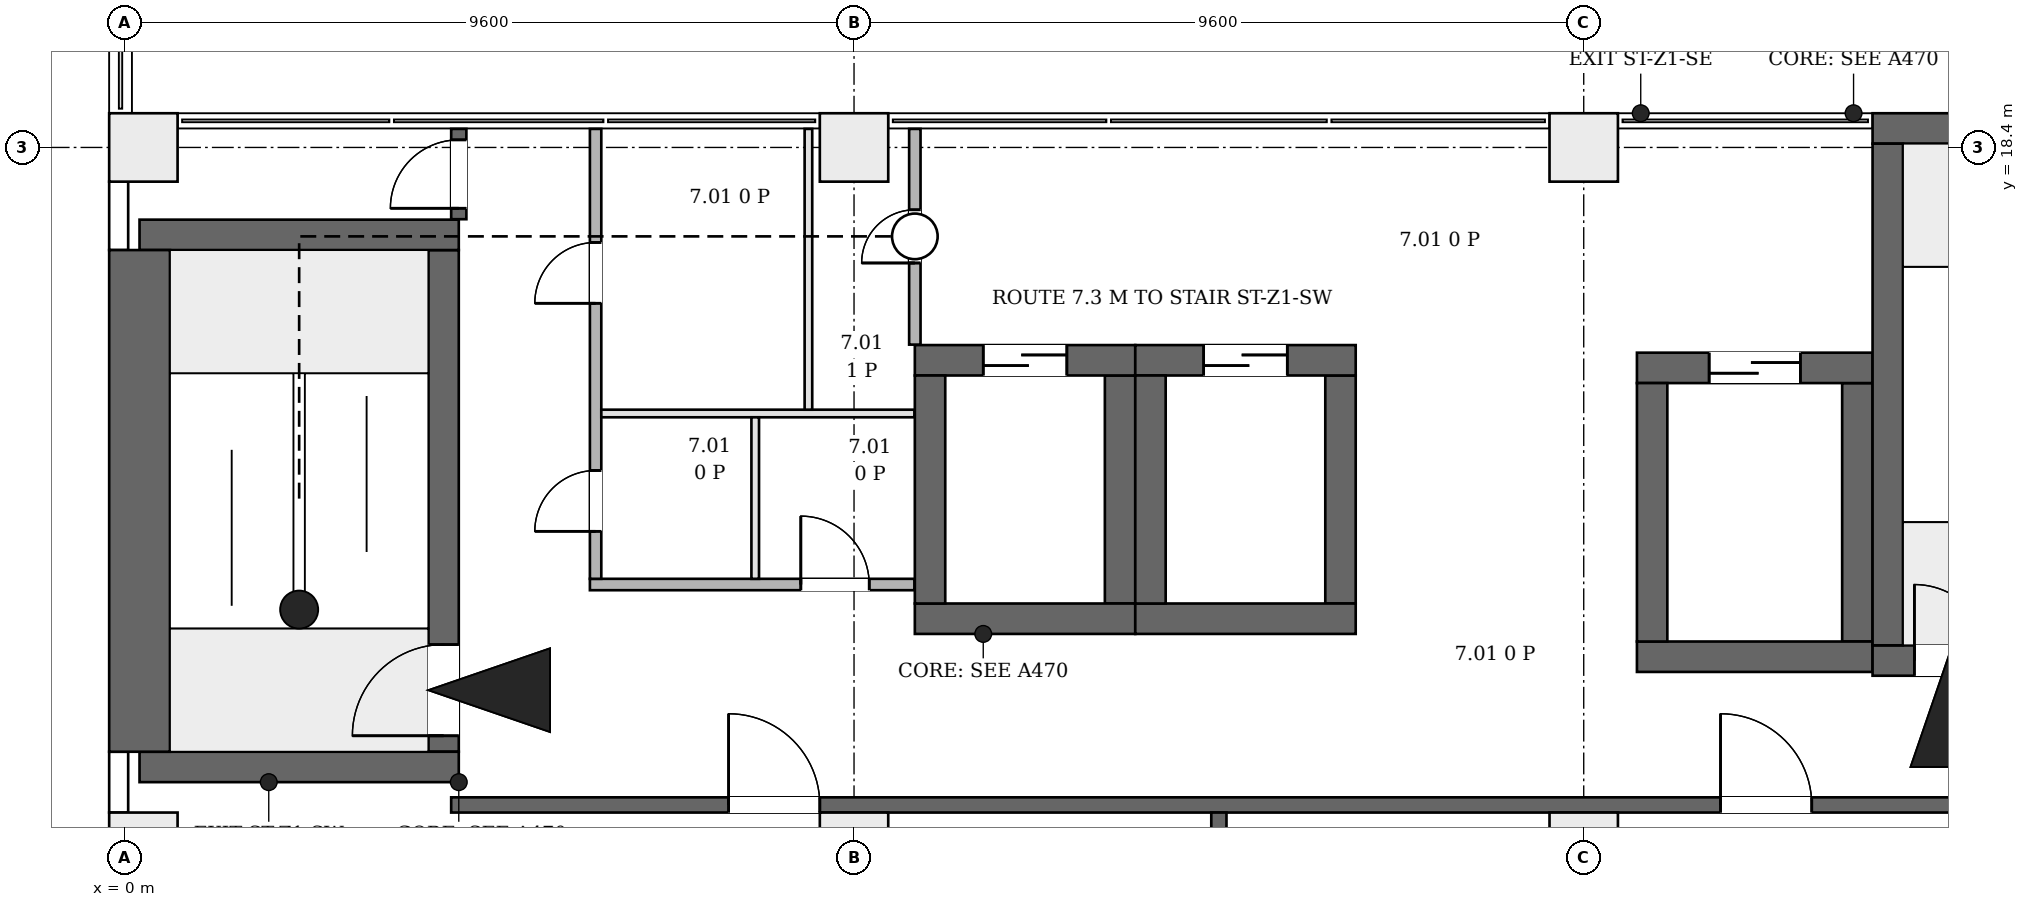
"""IFC4 building model, lengths in metres.
Left out: names, types, materials, properties, quantities, classifications, styles, units other than length and angle.
Written with IfcOpenShell. Run it as: python <this file> out.ifc"""

import sys

from ifc_helpers import new_model, si_unit, direction, frame, frame_2d, origin, origin_2d, place, context, subcontext, project, spatial, rectangle, extrude, element, fill, save


model = new_model("IFC4")
c1 = context("Model", 3, precision=1e-05, world=origin(), true_north=direction((0.0, 1.0)))
c2 = subcontext(c1, "Body", "Model", "MODEL_VIEW")
j1 = project(units=[si_unit("LENGTHUNIT", "METRE"), si_unit("PLANEANGLEUNIT", "RADIAN")], contexts=[c1])
p1 = place(None, origin())
s1 = spatial("IfcSite", under=j1, at=p1, CompositionType="ELEMENT")
p2 = place(p1, origin())
s2 = spatial("IfcBuilding", under=s1, at=p2, CompositionType="ELEMENT")
p3 = place(p2, frame((0.0, 0.0, 40.3)))
s3 = spatial("IfcBuildingStorey", under=s2, at=p3, CompositionType="ELEMENT", Elevation=40.3)
for number, where, z_axis, x_axis in (
    (1, (0.2, 10.25, 0.0), (0.0, 0.0, 1.0), (1.0, 0.0, 0.0)),
    (2, (0.2, 17.25, 0.0), (0.0, 0.0, 1.0), (1.0, 0.0, 0.0)),
):
    element("IfcWall", number, at=place(p3, frame(where, z_axis=z_axis, x_axis=x_axis)), inside=s3, PredefinedType="SHEAR", context=c2, shape_type="SweptSolid", body=[
        extrude(rectangle(XDim=4.2, YDim=0.4, at=frame_2d((2.1, 0.0))), origin(), (0.0, 0.0, 1.0), 4.2),
    ])
p4 = place(p3, frame((0.2, 10.45, 0.0), z_axis=(0.0, 0.0, 1.0), x_axis=(0.0, 1.0, 0.0)))
e3 = element("IfcWall", 3, at=p4, inside=s3, PredefinedType="SHEAR", context=c2, shape_type="SweptSolid", body=[
    extrude(rectangle(XDim=6.6, YDim=0.8, at=frame_2d((3.3, 0.0))), origin(), (0.0, 0.0, 1.0), 4.2),
])
p5 = place(p3, frame((4.2, 10.45, 0.0), z_axis=(0.0, 0.0, 1.0), x_axis=(0.0, 1.0, 0.0)))
e4 = element("IfcWall", 4, at=p5, inside=s3, PredefinedType="SHEAR", context=c2, shape_type="SweptSolid", body=[
    extrude(rectangle(XDim=6.6, YDim=0.4, at=frame_2d((3.3, 0.0))), origin(), (0.0, 0.0, 1.0), 4.2),
])
p6 = place(p5, frame((0.21, 0.0, 0.0)))
e5 = element("IfcOpeningElement", 5, at=p6, cuts=e4, PredefinedType="OPENING", context=c2, shape_type="SweptSolid", body=[
    extrude(rectangle(XDim=1.2, YDim=2.1, at=frame_2d((0.6, 1.05))), frame((0.0, 0.21, 0.0), z_axis=(0.0, -1.0, 0.0), x_axis=(1.0, 0.0, 0.0)), (0.0, 0.0, 1.0), 0.42),
])
p7 = place(p3, frame((23.0, 11.65, 0.0), z_axis=(0.0, 0.0, 1.0), x_axis=(1.0, 0.0, 0.0)))
e6 = element("IfcWall", 6, at=p7, inside=s3, PredefinedType="SHEAR", context=c2, shape_type="SweptSolid", body=[
    extrude(rectangle(XDim=4.2, YDim=0.4, at=frame_2d((2.1, 0.0))), origin(), (0.0, 0.0, 1.0), 4.2),
])
p8 = place(p7, frame((0.55, 0.0, 0.0)))
e7 = element("IfcOpeningElement", 7, at=p8, cuts=e6, PredefinedType="OPENING", context=c2, shape_type="SweptSolid", body=[
    extrude(rectangle(XDim=1.0, YDim=2.1, at=frame_2d((0.5, 1.05))), frame((0.0, 0.21, 0.0), z_axis=(0.0, -1.0, 0.0), x_axis=(1.0, 0.0, 0.0)), (0.0, 0.0, 1.0), 0.42),
])
p9 = place(p7, frame((2.65, 0.0, 0.0)))
e8 = element("IfcOpeningElement", 8, at=p9, cuts=e6, PredefinedType="OPENING", context=c2, shape_type="SweptSolid", body=[
    extrude(rectangle(XDim=1.0, YDim=2.1, at=frame_2d((0.5, 1.05))), frame((0.0, 0.21, 0.0), z_axis=(0.0, -1.0, 0.0), x_axis=(1.0, 0.0, 0.0)), (0.0, 0.0, 1.0), 0.42),
])
p10 = place(p3, frame((23.0, 18.65, 0.0), z_axis=(0.0, 0.0, 1.0), x_axis=(1.0, 0.0, 0.0)))
e9 = element("IfcWall", 9, at=p10, inside=s3, PredefinedType="SHEAR", context=c2, shape_type="SweptSolid", body=[
    extrude(rectangle(XDim=4.2, YDim=0.4, at=frame_2d((2.1, 0.0))), origin(), (0.0, 0.0, 1.0), 4.2),
])
p11 = place(p3, frame((23.2, 11.85, 0.0), z_axis=(0.0, 0.0, 1.0), x_axis=(0.0, 1.0, 0.0)))
e10 = element("IfcWall", 10, at=p11, inside=s3, PredefinedType="SHEAR", context=c2, shape_type="SweptSolid", body=[
    extrude(rectangle(XDim=6.6, YDim=0.4, at=frame_2d((3.3, 0.0))), origin(), (0.0, 0.0, 1.0), 4.2),
])
p12 = place(p3, frame((10.4, 12.2, 0.0), z_axis=(0.0, 0.0, 1.0), x_axis=(1.0, 0.0, 0.0)))
e11 = element("IfcWall", 11, at=p12, inside=s3, PredefinedType="SHEAR", context=c2, shape_type="SweptSolid", body=[
    extrude(rectangle(XDim=2.9, YDim=0.4, at=frame_2d((1.45, 0.0))), origin(), (0.0, 0.0, 1.0), 4.2),
])
p13 = place(p3, frame((10.4, 15.6, 0.0), z_axis=(0.0, 0.0, 1.0), x_axis=(1.0, 0.0, 0.0)))
e12 = element("IfcWall", 12, at=p13, inside=s3, PredefinedType="SHEAR", context=c2, shape_type="SweptSolid", body=[
    extrude(rectangle(XDim=2.9, YDim=0.4, at=frame_2d((1.45, 0.0))), origin(), (0.0, 0.0, 1.0), 4.2),
])
p14 = place(p13, frame((0.9, 0.0, 0.0)))
e13 = element("IfcOpeningElement", 13, at=p14, cuts=e12, PredefinedType="OPENING", context=c2, shape_type="SweptSolid", body=[
    extrude(rectangle(XDim=1.1, YDim=2.1, at=frame_2d((0.55, 1.05))), frame((0.0, 0.21, 0.0), z_axis=(0.0, -1.0, 0.0), x_axis=(1.0, 0.0, 0.0)), (0.0, 0.0, 1.0), 0.42),
])
for number, where, z_axis, x_axis in (
    (14, (10.6, 12.4, 0.0), (0.0, 0.0, 1.0), (0.0, 1.0, 0.0)),
    (15, (13.1, 12.4, 0.0), (0.0, 0.0, 1.0), (0.0, 1.0, 0.0)),
):
    element("IfcWall", number, at=place(p3, frame(where, z_axis=z_axis, x_axis=x_axis)), inside=s3, PredefinedType="SHEAR", context=c2, shape_type="SweptSolid", body=[
        extrude(rectangle(XDim=3.0, YDim=0.4, at=frame_2d((1.5, 0.0))), origin(), (0.0, 0.0, 1.0), 4.2),
    ])
p15 = place(p3, frame((13.3, 12.2, 0.0), z_axis=(0.0, 0.0, 1.0), x_axis=(1.0, 0.0, 0.0)))
e16 = element("IfcWall", 16, at=p15, inside=s3, PredefinedType="SHEAR", context=c2, shape_type="SweptSolid", body=[
    extrude(rectangle(XDim=2.9, YDim=0.4, at=frame_2d((1.45, 0.0))), origin(), (0.0, 0.0, 1.0), 4.2),
])
p16 = place(p3, frame((13.3, 15.6, 0.0), z_axis=(0.0, 0.0, 1.0), x_axis=(1.0, 0.0, 0.0)))
e17 = element("IfcWall", 17, at=p16, inside=s3, PredefinedType="SHEAR", context=c2, shape_type="SweptSolid", body=[
    extrude(rectangle(XDim=2.9, YDim=0.4, at=frame_2d((1.45, 0.0))), origin(), (0.0, 0.0, 1.0), 4.2),
])
p17 = place(p16, frame((0.9, 0.0, 0.0)))
e18 = element("IfcOpeningElement", 18, at=p17, cuts=e17, PredefinedType="OPENING", context=c2, shape_type="SweptSolid", body=[
    extrude(rectangle(XDim=1.1, YDim=2.1, at=frame_2d((0.55, 1.05))), frame((0.0, 0.21, 0.0), z_axis=(0.0, -1.0, 0.0), x_axis=(1.0, 0.0, 0.0)), (0.0, 0.0, 1.0), 0.42),
])
for number, where, z_axis, x_axis in (
    (19, (13.5, 12.4, 0.0), (0.0, 0.0, 1.0), (0.0, 1.0, 0.0)),
    (20, (16.0, 12.4, 0.0), (0.0, 0.0, 1.0), (0.0, 1.0, 0.0)),
):
    element("IfcWall", number, at=place(p3, frame(where, z_axis=z_axis, x_axis=x_axis)), inside=s3, PredefinedType="SHEAR", context=c2, shape_type="SweptSolid", body=[
        extrude(rectangle(XDim=3.0, YDim=0.4, at=frame_2d((1.5, 0.0))), origin(), (0.0, 0.0, 1.0), 4.2),
    ])
p18 = place(p3, frame((19.9, 11.7, 0.0), z_axis=(0.0, 0.0, 1.0), x_axis=(1.0, 0.0, 0.0)))
e21 = element("IfcWall", 21, at=p18, inside=s3, PredefinedType="SHEAR", context=c2, shape_type="SweptSolid", body=[
    extrude(rectangle(XDim=3.1, YDim=0.4, at=frame_2d((1.55, 0.0))), origin(), (0.0, 0.0, 1.0), 4.2),
])
p19 = place(p3, frame((19.9, 15.5, 0.0), z_axis=(0.0, 0.0, 1.0), x_axis=(1.0, 0.0, 0.0)))
e22 = element("IfcWall", 22, at=p19, inside=s3, PredefinedType="SHEAR", context=c2, shape_type="SweptSolid", body=[
    extrude(rectangle(XDim=3.1, YDim=0.4, at=frame_2d((1.55, 0.0))), origin(), (0.0, 0.0, 1.0), 4.2),
])
p20 = place(p19, frame((0.95, 0.0, 0.0)))
e23 = element("IfcOpeningElement", 23, at=p20, cuts=e22, PredefinedType="OPENING", context=c2, shape_type="SweptSolid", body=[
    extrude(rectangle(XDim=1.2, YDim=2.1, at=frame_2d((0.6, 1.05))), frame((0.0, 0.21, 0.0), z_axis=(0.0, -1.0, 0.0), x_axis=(1.0, 0.0, 0.0)), (0.0, 0.0, 1.0), 0.42),
])
for number, where, z_axis, x_axis in (
    (24, (20.1, 11.9, 0.0), (0.0, 0.0, 1.0), (0.0, 1.0, 0.0)),
    (25, (22.8, 11.9, 0.0), (0.0, 0.0, 1.0), (0.0, 1.0, 0.0)),
):
    element("IfcWall", number, at=place(p3, frame(where, z_axis=z_axis, x_axis=x_axis)), inside=s3, PredefinedType="SHEAR", context=c2, shape_type="SweptSolid", body=[
        extrude(rectangle(XDim=3.4, YDim=0.4, at=frame_2d((1.7, 0.0))), origin(), (0.0, 0.0, 1.0), 4.2),
    ])
for number, where, z_axis, x_axis in (
    (26, (0.25, 9.2, 0.0), (0.0, 0.0, 1.0), (1.0, 0.0, 0.0)),
    (27, (9.6, 9.2, 0.0), (0.0, 0.0, 1.0), (1.0, 0.0, 0.0)),
    (28, (19.2, 9.2, 0.0), (0.0, 0.0, 1.0), (1.0, 0.0, 0.0)),
    (29, (0.25, 18.4, 0.0), (0.0, 0.0, 1.0), (1.0, 0.0, 0.0)),
    (30, (9.6, 18.4, 0.0), (0.0, 0.0, 1.0), (1.0, 0.0, 0.0)),
    (31, (19.2, 18.4, 0.0), (0.0, 0.0, 1.0), (1.0, 0.0, 0.0)),
):
    element("IfcColumn", number, at=place(p3, frame(where, z_axis=z_axis, x_axis=x_axis)), inside=s3, PredefinedType="COLUMN", context=c2, shape_type="SweptSolid", body=[
        extrude(rectangle(XDim=0.9, YDim=0.9, at=origin_2d()), origin(), (0.0, 0.0, 1.0), 4.2),
    ])
p21 = place(p3, frame((-0.074, 10.45, 0.0), z_axis=(0.0, 0.0, 1.0), x_axis=(0.0, -1.0, 0.0)))
e32 = element("IfcWall", 32, at=p21, inside=s3, PredefinedType="ELEMENTEDWALL", context=c2, shape_type="SweptSolid", body=[
    extrude(rectangle(XDim=0.8, YDim=0.25, at=frame_2d((0.4, 0.0))), origin(), (0.0, 0.0, 1.0), 3.9),
])
p22 = place(p3, frame((-0.074, 17.95, 0.0), z_axis=(0.0, 0.0, 1.0), x_axis=(0.0, -1.0, 0.0)))
e33 = element("IfcWall", 33, at=p22, inside=s3, PredefinedType="ELEMENTEDWALL", context=c2, shape_type="SweptSolid", body=[
    extrude(rectangle(XDim=0.9, YDim=0.25, at=frame_2d((0.45, 0.0))), origin(), (0.0, 0.0, 1.0), 3.9),
])
p23 = place(p3, frame((4.3, 9.75, 0.0), z_axis=(0.0, 0.0, 1.0), x_axis=(1.0, 0.0, 0.0)))
e34 = element("IfcWall", 34, at=p23, inside=s3, PredefinedType="PARTITIONING", context=c2, shape_type="SweptSolid", body=[
    extrude(rectangle(XDim=43.894, YDim=0.2, at=frame_2d((21.947, 0.0))), origin(), (0.0, 0.0, 1.0), 3.9),
])
p24 = place(p23, frame((3.65, 0.0, 0.0)))
e35 = element("IfcOpeningElement", 35, at=p24, cuts=e34, PredefinedType="OPENING", context=c2, shape_type="SweptSolid", body=[
    extrude(rectangle(XDim=1.2, YDim=2.1, at=frame_2d((0.6, 1.05))), frame((0.0, 0.11, 0.0), z_axis=(0.0, -1.0, 0.0), x_axis=(1.0, 0.0, 0.0)), (0.0, 0.0, 1.0), 0.22),
])
p25 = place(p23, frame((16.7, 0.0, 0.0)))
e36 = element("IfcOpeningElement", 36, at=p25, cuts=e34, PredefinedType="OPENING", context=c2, shape_type="SweptSolid", body=[
    extrude(rectangle(XDim=1.2, YDim=2.1, at=frame_2d((0.6, 1.05))), frame((0.0, 0.11, 0.0), z_axis=(0.0, -1.0, 0.0), x_axis=(1.0, 0.0, 0.0)), (0.0, 0.0, 1.0), 0.22),
])
p26 = place(p23, frame((26.45, 0.0, 0.0)))
e37 = element("IfcOpeningElement", 37, at=p26, cuts=e34, PredefinedType="OPENING", context=c2, shape_type="SweptSolid", body=[
    extrude(rectangle(XDim=0.9, YDim=2.1, at=frame_2d((0.45, 1.05))), frame((0.0, 0.11, 0.0), z_axis=(0.0, -1.0, 0.0), x_axis=(1.0, 0.0, 0.0)), (0.0, 0.0, 1.0), 0.22),
])
p27 = place(p23, frame((36.0, 0.0, 0.0)))
e38 = element("IfcOpeningElement", 38, at=p27, cuts=e34, PredefinedType="OPENING", context=c2, shape_type="SweptSolid", body=[
    extrude(rectangle(XDim=1.2, YDim=2.1, at=frame_2d((0.6, 1.05))), frame((0.0, 0.11, 0.0), z_axis=(0.0, -1.0, 0.0), x_axis=(1.0, 0.0, 0.0)), (0.0, 0.0, 1.0), 0.22),
])
p28 = place(p3, frame((4.4, 17.456, 0.0), z_axis=(0.0, 0.0, 1.0), x_axis=(0.0, 1.0, 0.0)))
e39 = element("IfcWall", 39, at=p28, inside=s3, PredefinedType="PARTITIONING", context=c2, shape_type="SweptSolid", body=[
    extrude(rectangle(XDim=1.188, YDim=0.2, at=frame_2d((0.594, 0.0))), origin(), (0.0, 0.0, 1.0), 3.9),
])
p29 = place(p28, frame((0.144, 0.0, 0.0)))
e40 = element("IfcOpeningElement", 40, at=p29, cuts=e39, PredefinedType="OPENING", context=c2, shape_type="SweptSolid", body=[
    extrude(rectangle(XDim=0.9, YDim=2.1, at=frame_2d((0.45, 1.05))), frame((0.0, 0.11, 0.0), z_axis=(0.0, -1.0, 0.0), x_axis=(1.0, 0.0, 0.0)), (0.0, 0.0, 1.0), 0.22),
])
p30 = place(p3, frame((6.125, 12.65, 0.0), z_axis=(0.0, 0.0, 1.0), x_axis=(1.0, 0.0, 0.0)))
e41 = element("IfcWall", 41, at=p30, inside=s3, PredefinedType="PARTITIONING", context=c2, shape_type="SweptSolid", body=[
    extrude(rectangle(XDim=4.269, YDim=0.15, at=frame_2d((2.135, 0.0))), origin(), (0.0, 0.0, 1.0), 3.9),
])
p31 = place(p30, frame((2.775, 0.0, 0.0)))
e42 = element("IfcOpeningElement", 42, at=p31, cuts=e41, PredefinedType="OPENING", context=c2, shape_type="SweptSolid", body=[
    extrude(rectangle(XDim=0.9, YDim=2.1, at=frame_2d((0.45, 1.05))), frame((0.0, 0.085, 0.0), z_axis=(0.0, -1.0, 0.0), x_axis=(1.0, 0.0, 0.0)), (0.0, 0.0, 1.0), 0.17),
])
p32 = place(p3, frame((6.2, 12.725, 0.0), z_axis=(0.0, 0.0, 1.0), x_axis=(0.0, 1.0, 0.0)))
e43 = element("IfcWall", 43, at=p32, inside=s3, PredefinedType="PARTITIONING", context=c2, shape_type="SweptSolid", body=[
    extrude(rectangle(XDim=5.919, YDim=0.15, at=frame_2d((2.959, 0.0))), origin(), (0.0, 0.0, 1.0), 3.9),
])
p33 = place(p32, frame((0.625, 0.0, 0.0)))
e44 = element("IfcOpeningElement", 44, at=p33, cuts=e43, PredefinedType="OPENING", context=c2, shape_type="SweptSolid", body=[
    extrude(rectangle(XDim=0.8, YDim=2.1, at=frame_2d((0.4, 1.05))), frame((0.0, 0.085, 0.0), z_axis=(0.0, -1.0, 0.0), x_axis=(1.0, 0.0, 0.0)), (0.0, 0.0, 1.0), 0.17),
])
p34 = place(p32, frame((3.625, 0.0, 0.0)))
e45 = element("IfcOpeningElement", 45, at=p34, cuts=e43, PredefinedType="OPENING", context=c2, shape_type="SweptSolid", body=[
    extrude(rectangle(XDim=0.8, YDim=2.1, at=frame_2d((0.4, 1.05))), frame((0.0, 0.085, 0.0), z_axis=(0.0, -1.0, 0.0), x_axis=(1.0, 0.0, 0.0)), (0.0, 0.0, 1.0), 0.17),
])
p35 = place(p3, frame((6.275, 14.9, 0.0), z_axis=(0.0, 0.0, 1.0), x_axis=(1.0, 0.0, 0.0)))
e46 = element("IfcWall", 46, at=p35, inside=s3, PredefinedType="PARTITIONING", context=c2, shape_type="SweptSolid", body=[
    extrude(rectangle(XDim=4.119, YDim=0.1, at=frame_2d((2.06, 0.0))), origin(), (0.0, 0.0, 1.0), 3.9),
])
p36 = place(p3, frame((8.3, 12.725, 0.0), z_axis=(0.0, 0.0, 1.0), x_axis=(0.0, 1.0, 0.0)))
e47 = element("IfcWall", 47, at=p36, inside=s3, PredefinedType="PARTITIONING", context=c2, shape_type="SweptSolid", body=[
    extrude(rectangle(XDim=2.125, YDim=0.1, at=frame_2d((1.062, 0.0))), origin(), (0.0, 0.0, 1.0), 3.9),
])
p37 = place(p3, frame((9.0, 14.95, 0.0), z_axis=(0.0, 0.0, 1.0), x_axis=(0.0, 1.0, 0.0)))
e48 = element("IfcWall", 48, at=p37, inside=s3, PredefinedType="PARTITIONING", context=c2, shape_type="SweptSolid", body=[
    extrude(rectangle(XDim=3.694, YDim=0.1, at=frame_2d((1.847, 0.0))), origin(), (0.0, 0.0, 1.0), 3.9),
])
p38 = place(p3, frame((10.4, 15.806, 0.0), z_axis=(0.0, 0.0, 1.0), x_axis=(0.0, 1.0, 0.0)))
e49 = element("IfcWall", 49, at=p38, inside=s3, PredefinedType="PARTITIONING", context=c2, shape_type="SweptSolid", body=[
    extrude(rectangle(XDim=2.838, YDim=0.15, at=frame_2d((1.419, 0.0))), origin(), (0.0, 0.0, 1.0), 3.9),
])
p39 = place(p38, frame((1.074, 0.0, 0.0)))
e50 = element("IfcOpeningElement", 50, at=p39, cuts=e49, PredefinedType="OPENING", context=c2, shape_type="SweptSolid", body=[
    extrude(rectangle(XDim=0.7, YDim=2.1, at=frame_2d((0.35, 1.05))), frame((0.0, 0.085, 0.0), z_axis=(0.0, -1.0, 0.0), x_axis=(1.0, 0.0, 0.0)), (0.0, 0.0, 1.0), 0.17),
])
p40 = place(p3, frame((14.4, 0.006, 0.0), z_axis=(0.0, 0.0, 1.0), x_axis=(0.0, 1.0, 0.0)))
e51 = element("IfcWall", 51, at=p40, inside=s3, PredefinedType="PARTITIONING", context=c2, shape_type="SweptSolid", body=[
    extrude(rectangle(XDim=9.644, YDim=0.2, at=frame_2d((4.822, 0.0))), origin(), (0.0, 0.0, 1.0), 3.9),
])
p41 = place(p6, origin())
e52 = element("IfcDoor", 52, at=p41, inside=s3, OperationType="SINGLE_SWING_RIGHT", PredefinedType="DOOR", context=c2, shape_type="SweptSolid", body=[
    extrude(rectangle(XDim=1.2, YDim=2.1, at=frame_2d((0.6, 1.05))), frame((0.0, 0.025, 0.0), z_axis=(0.0, -1.0, 0.0), x_axis=(1.0, 0.0, 0.0)), (0.0, 0.0, 1.0), 0.05),
])
fill(e5, e52)
p42 = place(p8, origin())
e53 = element("IfcDoor", 53, at=p42, inside=s3, OperationType="SINGLE_SWING_RIGHT", PredefinedType="DOOR", context=c2, shape_type="SweptSolid", body=[
    extrude(rectangle(XDim=1.0, YDim=2.1, at=frame_2d((0.5, 1.05))), frame((0.0, 0.025, 0.0), z_axis=(0.0, -1.0, 0.0), x_axis=(1.0, 0.0, 0.0)), (0.0, 0.0, 1.0), 0.05),
])
fill(e7, e53)
p43 = place(p14, origin())
e54 = element("IfcDoor", 54, at=p43, inside=s3, OperationType="DOUBLE_DOOR_SLIDING", PredefinedType="DOOR", context=c2, shape_type="SweptSolid", body=[
    extrude(rectangle(XDim=1.1, YDim=2.1, at=frame_2d((0.55, 1.05))), frame((0.0, 0.025, 0.0), z_axis=(0.0, -1.0, 0.0), x_axis=(1.0, 0.0, 0.0)), (0.0, 0.0, 1.0), 0.05),
])
fill(e13, e54)
p44 = place(p17, origin())
e55 = element("IfcDoor", 55, at=p44, inside=s3, OperationType="DOUBLE_DOOR_SLIDING", PredefinedType="DOOR", context=c2, shape_type="SweptSolid", body=[
    extrude(rectangle(XDim=1.1, YDim=2.1, at=frame_2d((0.55, 1.05))), frame((0.0, 0.025, 0.0), z_axis=(0.0, -1.0, 0.0), x_axis=(1.0, 0.0, 0.0)), (0.0, 0.0, 1.0), 0.05),
])
fill(e18, e55)
p45 = place(p20, origin())
e56 = element("IfcDoor", 56, at=p45, inside=s3, OperationType="DOUBLE_DOOR_SLIDING", PredefinedType="DOOR", context=c2, shape_type="SweptSolid", body=[
    extrude(rectangle(XDim=1.2, YDim=2.1, at=frame_2d((0.6, 1.05))), frame((0.0, 0.025, 0.0), z_axis=(0.0, -1.0, 0.0), x_axis=(1.0, 0.0, 0.0)), (0.0, 0.0, 1.0), 0.05),
])
fill(e23, e56)
p46 = place(p29, origin())
e57 = element("IfcDoor", 57, at=p46, inside=s3, OperationType="SINGLE_SWING_LEFT", PredefinedType="DOOR", context=c2, shape_type="SweptSolid", body=[
    extrude(rectangle(XDim=0.9, YDim=2.1, at=frame_2d((0.45, 1.05))), frame((0.0, 0.025, 0.0), z_axis=(0.0, -1.0, 0.0), x_axis=(1.0, 0.0, 0.0)), (0.0, 0.0, 1.0), 0.05),
])
fill(e40, e57)
p47 = place(p33, origin())
e58 = element("IfcDoor", 58, at=p47, inside=s3, OperationType="SINGLE_SWING_LEFT", PredefinedType="DOOR", context=c2, shape_type="SweptSolid", body=[
    extrude(rectangle(XDim=0.8, YDim=2.1, at=frame_2d((0.4, 1.05))), frame((0.0, 0.025, 0.0), z_axis=(0.0, -1.0, 0.0), x_axis=(1.0, 0.0, 0.0)), (0.0, 0.0, 1.0), 0.05),
])
fill(e44, e58)
p48 = place(p31, origin())
e59 = element("IfcDoor", 59, at=p48, inside=s3, OperationType="SINGLE_SWING_RIGHT", PredefinedType="DOOR", context=c2, shape_type="SweptSolid", body=[
    extrude(rectangle(XDim=0.9, YDim=2.1, at=frame_2d((0.45, 1.05))), frame((0.0, 0.025, 0.0), z_axis=(0.0, -1.0, 0.0), x_axis=(1.0, 0.0, 0.0)), (0.0, 0.0, 1.0), 0.05),
])
fill(e42, e59)
p49 = place(p34, origin())
e60 = element("IfcDoor", 60, at=p49, inside=s3, OperationType="SINGLE_SWING_LEFT", PredefinedType="DOOR", context=c2, shape_type="SweptSolid", body=[
    extrude(rectangle(XDim=0.8, YDim=2.1, at=frame_2d((0.4, 1.05))), frame((0.0, 0.025, 0.0), z_axis=(0.0, -1.0, 0.0), x_axis=(1.0, 0.0, 0.0)), (0.0, 0.0, 1.0), 0.05),
])
fill(e45, e60)
p50 = place(p39, origin())
e61 = element("IfcDoor", 61, at=p50, inside=s3, OperationType="SINGLE_SWING_LEFT", PredefinedType="DOOR", context=c2, shape_type="SweptSolid", body=[
    extrude(rectangle(XDim=0.7, YDim=2.1, at=frame_2d((0.35, 1.05))), frame((0.0, 0.025, 0.0), z_axis=(0.0, -1.0, 0.0), x_axis=(1.0, 0.0, 0.0)), (0.0, 0.0, 1.0), 0.05),
])
fill(e50, e61)
p51 = place(p24, origin())
e62 = element("IfcDoor", 62, at=p51, inside=s3, OperationType="SINGLE_SWING_RIGHT", PredefinedType="DOOR", context=c2, shape_type="SweptSolid", body=[
    extrude(rectangle(XDim=1.2, YDim=2.1, at=frame_2d((0.6, 1.05))), frame((0.0, 0.025, 0.0), z_axis=(0.0, -1.0, 0.0), x_axis=(1.0, 0.0, 0.0)), (0.0, 0.0, 1.0), 0.05),
])
fill(e35, e62)
p52 = place(p25, origin())
e63 = element("IfcDoor", 63, at=p52, inside=s3, OperationType="SINGLE_SWING_RIGHT", PredefinedType="DOOR", context=c2, shape_type="SweptSolid", body=[
    extrude(rectangle(XDim=1.2, YDim=2.1, at=frame_2d((0.6, 1.05))), frame((0.0, 0.025, 0.0), z_axis=(0.0, -1.0, 0.0), x_axis=(1.0, 0.0, 0.0)), (0.0, 0.0, 1.0), 0.05),
])
fill(e36, e63)
save(model, sys.argv[1])
